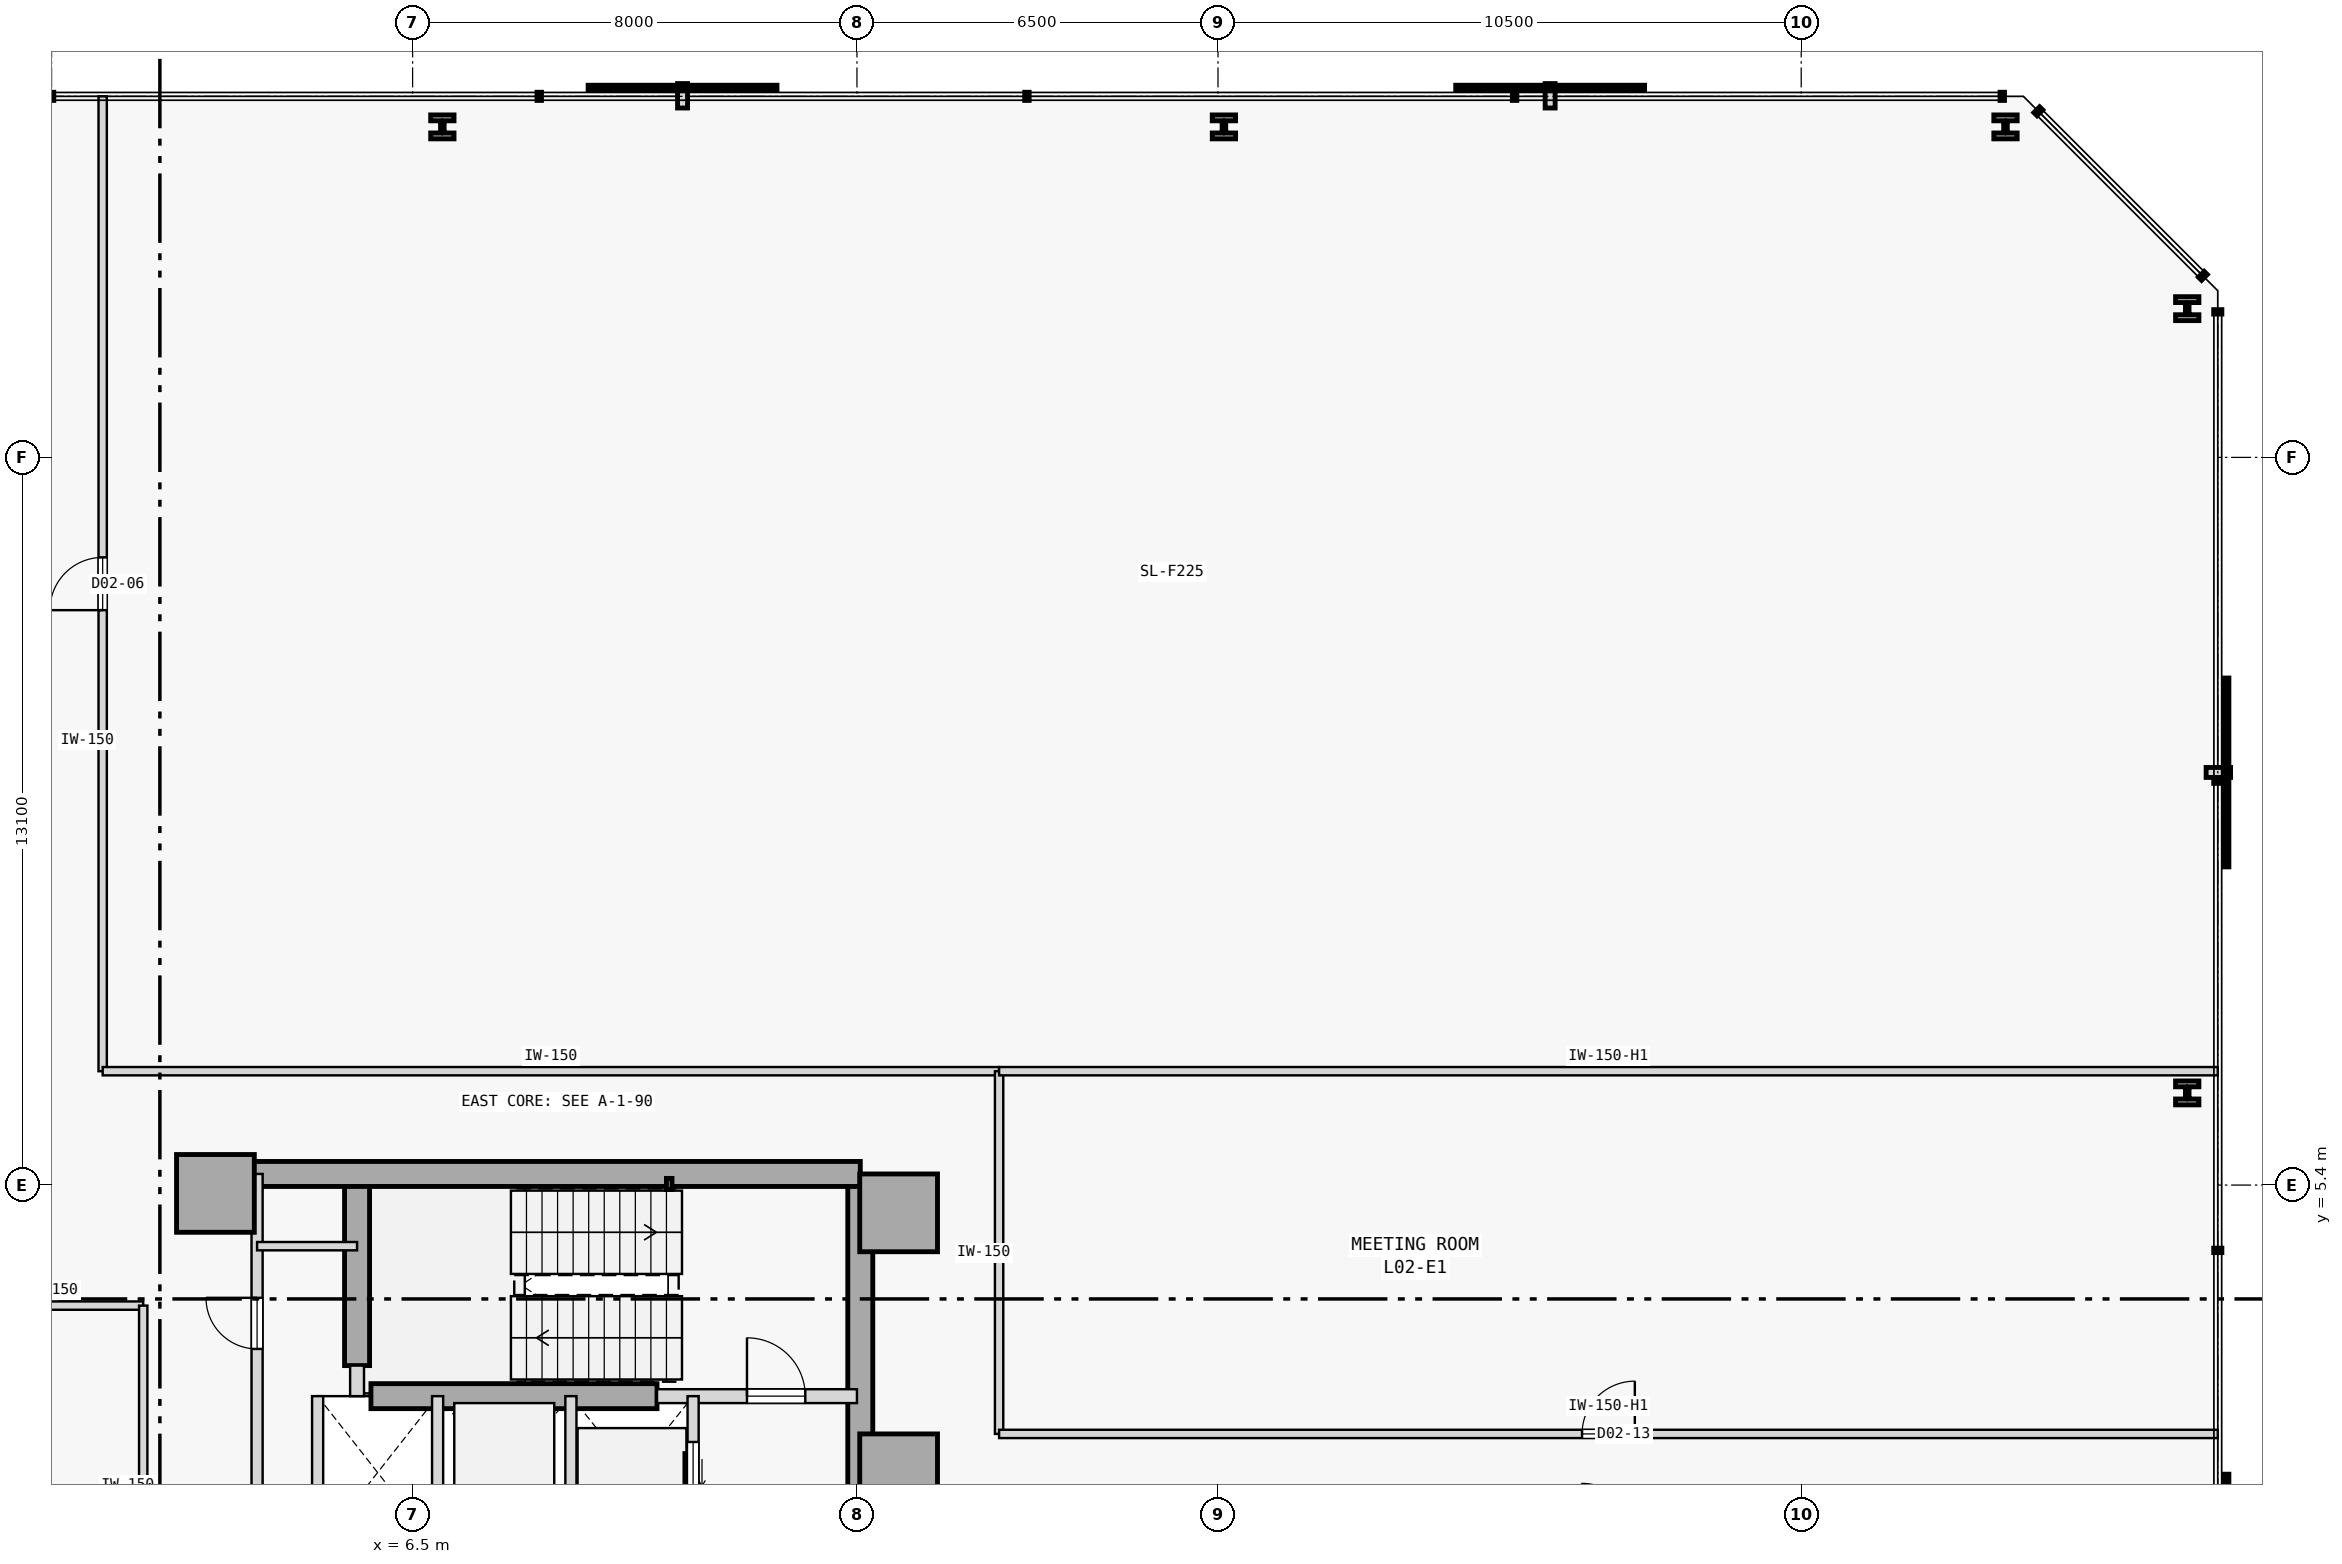
"""IFC4 building model, lengths in metres.
Left out: names, types, materials, properties, quantities, classifications, styles, units other than length and angle.
Written with IfcOpenShell. Run it as: python <this file> out.ifc"""

import sys

from ifc_helpers import new_model, si_unit, direction, frame, frame_2d, origin, origin_2d, place, context, subcontext, project, spatial, rectangle, hollow_rectangle, i_section, extrude, element, fill, save


model = new_model("IFC4")
c1 = context("Model", 3, precision=1e-05, world=origin(), true_north=direction((0.0, 1.0)))
c2 = subcontext(c1, "Body", "Model", "MODEL_VIEW")
j1 = project(units=[si_unit("LENGTHUNIT", "METRE"), si_unit("PLANEANGLEUNIT", "RADIAN")], contexts=[c1])
p1 = place(None, origin())
s1 = spatial("IfcSite", under=j1, at=p1, CompositionType="ELEMENT")
p2 = place(p1, origin())
s2 = spatial("IfcBuilding", under=s1, at=p2, CompositionType="ELEMENT")
p3 = place(p2, frame((0.0, 0.0, 14.2)))
s3 = spatial("IfcBuildingStorey", under=s2, at=p3, CompositionType="ELEMENT", Elevation=14.2)
for number, where, z_axis, x_axis in (
    (1, (15.25, 4.9, 0.0), (0.0, 0.0, 1.0), (1.0, 0.0, 0.0)),
    (2, (15.25, 0.22, 0.0), (0.0, 0.0, 1.0), (1.0, 0.0, 0.0)),
    (3, (2.95, 5.25, 0.0), (0.0, 0.0, 1.0), (1.0, 0.0, 0.0)),
):
    element("IfcColumn", number, at=place(p3, frame(where, z_axis=z_axis, x_axis=x_axis)), inside=s3, PredefinedType="COLUMN", context=c2, shape_type="SweptSolid", body=[
        extrude(rectangle(XDim=1.4, YDim=1.4, at=origin_2d()), origin(), (0.0, 0.0, 1.0), 3.8),
    ])
p4 = place(p3, frame((3.15, 5.6, 0.0), z_axis=(0.0, 0.0, 1.0), x_axis=(1.0, 0.0, 0.0)))
e4 = element("IfcWall", 4, at=p4, inside=s3, PredefinedType="SHEAR", context=c2, shape_type="SweptSolid", body=[
    extrude(rectangle(XDim=11.41, YDim=0.45, at=frame_2d((5.705, 0.0))), origin(), (0.0, 0.0, 1.0), 3.575),
])
p5 = place(p3, frame((14.56, -5.375, 0.0), z_axis=(0.0, 0.0, 1.0), x_axis=(0.0, 1.0, 0.0)))
e5 = element("IfcWall", 5, at=p5, inside=s3, PredefinedType="SHEAR", context=c2, shape_type="SweptSolid", body=[
    extrude(rectangle(XDim=10.75, YDim=0.45, at=frame_2d((5.375, 0.0))), origin(), (0.0, 0.0, 1.0), 3.575),
])
p6 = place(p3, frame((5.5, 2.15, 0.0), z_axis=(0.0, 0.0, 1.0), x_axis=(0.0, 1.0, 0.0)))
e6 = element("IfcWall", 6, at=p6, inside=s3, PredefinedType="SHEAR", context=c2, shape_type="SweptSolid", body=[
    extrude(rectangle(XDim=3.225, YDim=0.45, at=frame_2d((1.613, 0.0))), origin(), (0.0, 0.0, 1.0), 3.575),
])
p7 = place(p3, frame((5.75, 1.6, 0.0), z_axis=(0.0, 0.0, 1.0), x_axis=(1.0, 0.0, 0.0)))
e7 = element("IfcWall", 7, at=p7, inside=s3, PredefinedType="SHEAR", context=c2, shape_type="SweptSolid", body=[
    extrude(rectangle(XDim=5.15, YDim=0.45, at=frame_2d((2.575, 0.0))), origin(), (0.0, 0.0, 1.0), 3.575),
])
p8 = place(p3, frame((11.12, 5.42, 0.0), z_axis=(0.0, 0.0, 1.0), x_axis=(1.0, 0.0, 0.0)))
e8 = element("IfcColumn", 8, at=p8, inside=s3, PredefinedType="COLUMN", context=c2, shape_type="SweptSolid", body=[
    extrude(hollow_rectangle(XDim=0.1, YDim=0.2, WallThickness=0.008, at=origin_2d()), origin(), (0.0, 0.0, 1.0), 3.8),
])
for number, where, z_axis, x_axis in (
    (9, (38.45, 7.059, 0.0), (0.0, 0.0, 1.0), (1.0, 0.0, 0.0)),
    (10, (38.45, 21.178, 0.0), (0.0, 0.0, 1.0), (1.0, 0.0, 0.0)),
    (11, (35.178, 24.45, 0.0), (0.0, 0.0, 1.0), (1.0, 0.0, 0.0)),
    (12, (21.107, 24.45, 0.0), (0.0, 0.0, 1.0), (1.0, 0.0, 0.0)),
    (13, (7.036, 24.45, 0.0), (0.0, 0.0, 1.0), (1.0, 0.0, 0.0)),
):
    element("IfcColumn", number, at=place(p3, frame(where, z_axis=z_axis, x_axis=x_axis)), inside=s3, PredefinedType="COLUMN", context=c2, shape_type="SweptSolid", body=[
        extrude(i_section(OverallWidth=0.42, OverallDepth=0.431, WebThickness=0.065, FlangeThickness=0.106, FilletRadius=0.015, at=origin_2d()), origin(), (0.0, 0.0, 1.0), 3.8),
    ])
p9 = place(p3, frame((10.9, 1.6, 0.0), z_axis=(0.0, 0.0, 1.0), x_axis=(1.0, 0.0, 0.0)))
e14 = element("IfcWall", 14, at=p9, inside=s3, PredefinedType="STANDARD", context=c2, shape_type="SweptSolid", body=[
    extrude(rectangle(XDim=3.6, YDim=0.25, at=frame_2d((1.8, 0.0))), origin(), (0.0, 0.0, 1.0), 3.575),
])
p10 = place(p9, frame((1.62, 0.0, 0.0)))
e15 = element("IfcOpeningElement", 15, at=p10, cuts=e14, PredefinedType="OPENING", context=c2, shape_type="SweptSolid", body=[
    extrude(rectangle(XDim=1.05, YDim=2.15, at=frame_2d((0.525, 1.075))), frame((0.0, 0.135, 0.0), z_axis=(0.0, -1.0, 0.0), x_axis=(1.0, 0.0, 0.0)), (0.0, 0.0, 1.0), 0.27),
])
p11 = place(p3, frame((5.5, 1.6, 0.0), z_axis=(0.0, 0.0, 1.0), x_axis=(0.0, 1.0, 0.0)))
e16 = element("IfcWall", 16, at=p11, inside=s3, PredefinedType="STANDARD", context=c2, shape_type="SweptSolid", body=[
    extrude(rectangle(XDim=0.55, YDim=0.25, at=frame_2d((0.275, 0.0))), origin(), (0.0, 0.0, 1.0), 3.575),
])
p12 = place(p3, frame((3.7, -1.15, 0.0), z_axis=(0.0, 0.0, 1.0), x_axis=(0.0, 1.0, 0.0)))
e17 = element("IfcWall", 17, at=p12, inside=s3, PredefinedType="STANDARD", context=c2, shape_type="SweptSolid", body=[
    extrude(rectangle(XDim=6.75, YDim=0.2, at=frame_2d((3.375, 0.0))), origin(), (0.0, 0.0, 1.0), 3.575),
])
p13 = place(p12, frame((3.6, 0.0, 0.0)))
e18 = element("IfcOpeningElement", 18, at=p13, cuts=e17, PredefinedType="OPENING", context=c2, shape_type="SweptSolid", body=[
    extrude(rectangle(XDim=0.92, YDim=2.15, at=frame_2d((0.46, 1.075))), frame((0.0, 0.11, 0.0), z_axis=(0.0, -1.0, 0.0), x_axis=(1.0, 0.0, 0.0)), (0.0, 0.0, 1.0), 0.22),
])
p14 = place(p3, frame((11.55, -1.15, 0.0), z_axis=(0.0, 0.0, 1.0), x_axis=(0.0, 1.0, 0.0)))
e19 = element("IfcWall", 19, at=p14, inside=s3, PredefinedType="STANDARD", context=c2, shape_type="SweptSolid", body=[
    extrude(rectangle(XDim=2.75, YDim=0.2, at=frame_2d((1.375, 0.0))), origin(), (0.0, 0.0, 1.0), 3.575),
])
p15 = place(p14, frame((0.825, 0.0, 0.0)))
e20 = element("IfcOpeningElement", 20, at=p15, cuts=e19, PredefinedType="OPENING", context=c2, shape_type="SweptSolid", body=[
    extrude(rectangle(XDim=1.1, YDim=2.15, at=frame_2d((0.55, 1.075))), frame((0.0, 0.11, 0.0), z_axis=(0.0, -1.0, 0.0), x_axis=(1.0, 0.0, 0.0)), (0.0, 0.0, 1.0), 0.22),
])
for number, where, z_axis, x_axis in (
    (21, (9.35, -1.15, 0.0), (0.0, 0.0, 1.0), (0.0, 1.0, 0.0)),
    (22, (6.95, -1.15, 0.0), (0.0, 0.0, 1.0), (0.0, 1.0, 0.0)),
    (23, (4.79, -1.15, 0.0), (0.0, 0.0, 1.0), (0.0, 1.0, 0.0)),
):
    element("IfcWall", number, at=place(p3, frame(where, z_axis=z_axis, x_axis=x_axis)), inside=s3, PredefinedType="STANDARD", context=c2, shape_type="SweptSolid", body=[
        extrude(rectangle(XDim=2.75, YDim=0.2, at=frame_2d((1.375, 0.0))), origin(), (0.0, 0.0, 1.0), 3.575),
    ])
p16 = place(p3, frame((3.7, 4.3, 0.0), z_axis=(0.0, 0.0, 1.0), x_axis=(1.0, 0.0, 0.0)))
e24 = element("IfcWall", 24, at=p16, inside=s3, PredefinedType="PARTITIONING", context=c2, shape_type="SweptSolid", body=[
    extrude(rectangle(XDim=1.8, YDim=0.15, at=frame_2d((0.9, 0.0))), origin(), (0.0, 0.0, 1.0), 3.575),
])
p17 = place(p3, frame((-1.65, 3.23, 0.0), z_axis=(0.0, 0.0, 1.0), x_axis=(1.0, 0.0, 0.0)))
e25 = element("IfcWall", 25, at=p17, inside=s3, PredefinedType="PARTITIONING", context=c2, shape_type="SweptSolid", body=[
    extrude(rectangle(XDim=3.3, YDim=0.15, at=frame_2d((1.65, 0.0))), origin(), (0.0, 0.0, 1.0), 3.575),
])
p18 = place(p3, frame((1.65, -3.23, 0.0), z_axis=(0.0, 0.0, 1.0), x_axis=(0.0, 1.0, 0.0)))
e26 = element("IfcWall", 26, at=p18, inside=s3, PredefinedType="PARTITIONING", context=c2, shape_type="SweptSolid", body=[
    extrude(rectangle(XDim=6.46, YDim=0.15, at=frame_2d((3.23, 0.0))), origin(), (0.0, 0.0, 1.0), 3.575),
])
p19 = place(p3, frame((0.92, 7.45, 0.0), z_axis=(0.0, 0.0, 1.0), x_axis=(0.0, 1.0, 0.0)))
e27 = element("IfcWall", 27, at=p19, inside=s3, PredefinedType="PARTITIONING", context=c2, shape_type="SweptSolid", body=[
    extrude(rectangle(XDim=17.55, YDim=0.15, at=frame_2d((8.775, 0.0))), origin(), (0.0, 0.0, 1.0), 3.575),
])
p20 = place(p19, frame((8.3, 0.0, 0.0)))
e28 = element("IfcOpeningElement", 28, at=p20, cuts=e27, PredefinedType="OPENING", context=c2, shape_type="SweptSolid", body=[
    extrude(rectangle(XDim=0.95, YDim=2.15, at=frame_2d((0.475, 1.075))), frame((0.0, 0.085, 0.0), z_axis=(0.0, -1.0, 0.0), x_axis=(1.0, 0.0, 0.0)), (0.0, 0.0, 1.0), 0.17),
])
p21 = place(p3, frame((0.92, 7.45, 0.0), z_axis=(0.0, 0.0, 1.0), x_axis=(1.0, 0.0, 0.0)))
e29 = element("IfcWall", 29, at=p21, inside=s3, PredefinedType="PARTITIONING", context=c2, shape_type="SweptSolid", body=[
    extrude(rectangle(XDim=16.139, YDim=0.15, at=frame_2d((8.07, 0.0))), origin(), (0.0, 0.0, 1.0), 3.575),
])
p22 = place(p3, frame((17.059, 0.92, 0.0), z_axis=(0.0, 0.0, 1.0), x_axis=(0.0, 1.0, 0.0)))
e30 = element("IfcWall", 30, at=p22, inside=s3, PredefinedType="PARTITIONING", context=c2, shape_type="SweptSolid", body=[
    extrude(rectangle(XDim=6.53, YDim=0.15, at=frame_2d((3.265, 0.0))), origin(), (0.0, 0.0, 1.0), 3.575),
])
p23 = place(p3, frame((17.059, 0.92, 0.0), z_axis=(0.0, 0.0, 1.0), x_axis=(1.0, 0.0, 0.0)))
e31 = element("IfcWall", 31, at=p23, inside=s3, PredefinedType="PARTITIONING", context=c2, shape_type="SweptSolid", body=[
    extrude(rectangle(XDim=21.941, YDim=0.15, at=frame_2d((10.97, 0.0))), origin(), (0.0, 0.0, 1.0), 3.125),
])
p24 = place(p23, frame((10.496, 0.0, 0.0)))
e32 = element("IfcOpeningElement", 32, at=p24, cuts=e31, PredefinedType="OPENING", context=c2, shape_type="SweptSolid", body=[
    extrude(rectangle(XDim=0.95, YDim=2.15, at=frame_2d((0.475, 1.075))), frame((0.0, 0.085, 0.0), z_axis=(0.0, -1.0, 0.0), x_axis=(1.0, 0.0, 0.0)), (0.0, 0.0, 1.0), 0.17),
])
p25 = place(p3, frame((17.059, 7.45, 0.0), z_axis=(0.0, 0.0, 1.0), x_axis=(1.0, 0.0, 0.0)))
e33 = element("IfcWall", 33, at=p25, inside=s3, PredefinedType="PARTITIONING", context=c2, shape_type="SweptSolid", body=[
    extrude(rectangle(XDim=21.941, YDim=0.15, at=frame_2d((10.97, 0.0))), origin(), (0.0, 0.0, 1.0), 3.125),
])
p26 = place(p10, origin())
e34 = element("IfcDoor", 34, at=p26, inside=s3, OperationType="SINGLE_SWING_LEFT", PredefinedType="DOOR", context=c2, shape_type="SweptSolid", body=[
    extrude(rectangle(XDim=1.05, YDim=2.15, at=frame_2d((0.525, 1.075))), frame((0.0, 0.025, 0.0), z_axis=(0.0, -1.0, 0.0), x_axis=(1.0, 0.0, 0.0)), (0.0, 0.0, 1.0), 0.05),
])
fill(e15, e34)
p27 = place(p15, origin())
e35 = element("IfcDoor", 35, at=p27, inside=s3, OperationType="SLIDING_TO_RIGHT", PredefinedType="DOOR", context=c2, shape_type="SweptSolid", body=[
    extrude(rectangle(XDim=1.1, YDim=2.15, at=frame_2d((0.55, 1.075))), frame((0.0, 0.025, 0.0), z_axis=(0.0, -1.0, 0.0), x_axis=(1.0, 0.0, 0.0)), (0.0, 0.0, 1.0), 0.05),
])
fill(e20, e35)
p28 = place(p13, origin())
e36 = element("IfcDoor", 36, at=p28, inside=s3, OperationType="SINGLE_SWING_RIGHT", PredefinedType="DOOR", context=c2, shape_type="SweptSolid", body=[
    extrude(rectangle(XDim=0.92, YDim=2.15, at=frame_2d((0.46, 1.075))), frame((0.0, 0.025, 0.0), z_axis=(0.0, -1.0, 0.0), x_axis=(1.0, 0.0, 0.0)), (0.0, 0.0, 1.0), 0.05),
])
fill(e18, e36)
p29 = place(p20, origin())
e37 = element("IfcDoor", 37, at=p29, inside=s3, OperationType="SINGLE_SWING_LEFT", PredefinedType="DOOR", context=c2, shape_type="SweptSolid", body=[
    extrude(rectangle(XDim=0.95, YDim=2.15, at=frame_2d((0.475, 1.075))), frame((0.0, 0.025, 0.0), z_axis=(0.0, -1.0, 0.0), x_axis=(1.0, 0.0, 0.0)), (0.0, 0.0, 1.0), 0.05),
])
fill(e28, e37)
p30 = place(p24, origin())
e38 = element("IfcDoor", 38, at=p30, inside=s3, OperationType="SINGLE_SWING_RIGHT", PredefinedType="DOOR", context=c2, shape_type="SweptSolid", body=[
    extrude(rectangle(XDim=0.95, YDim=2.15, at=frame_2d((0.475, 1.075))), frame((0.0, 0.025, 0.0), z_axis=(0.0, -1.0, 0.0), x_axis=(1.0, 0.0, 0.0)), (0.0, 0.0, 1.0), 0.05),
])
fill(e32, e38)
save(model, sys.argv[1])
